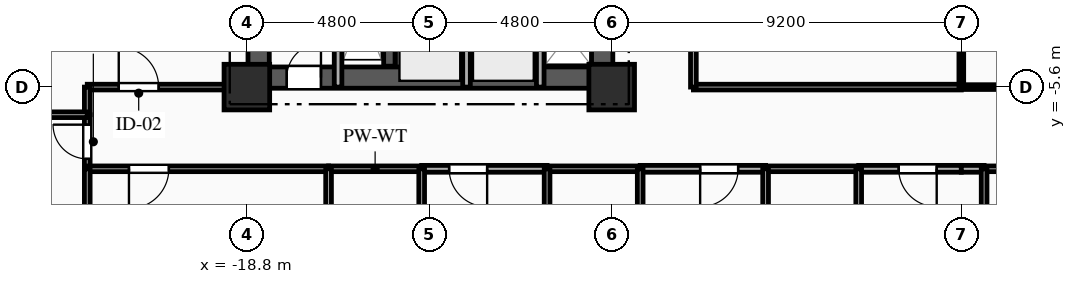
"""IFC4 building model, lengths in metres.
Left out: names, types, materials, properties, quantities, classifications, styles, units other than length and angle.
Written with IfcOpenShell. Run it as: python <this file> out.ifc"""

import sys

from ifc_helpers import new_model, si_unit, direction, frame, frame_2d, origin, origin_2d, place, context, subcontext, project, spatial, rectangle, extrude, element, fill, save


model = new_model("IFC4")
c1 = context("Model", 3, precision=1e-05, world=origin(), true_north=direction((0.0, 1.0)))
c2 = subcontext(c1, "Body", "Model", "MODEL_VIEW")
j1 = project(units=[si_unit("LENGTHUNIT", "METRE"), si_unit("PLANEANGLEUNIT", "RADIAN")], contexts=[c1])
p1 = place(None, origin())
s1 = spatial("IfcSite", under=j1, at=p1, CompositionType="ELEMENT")
p2 = place(p1, origin())
s2 = spatial("IfcBuilding", under=s1, at=p2, CompositionType="ELEMENT")
p3 = place(p2, frame((0.0, 0.0, 63.85)))
s3 = spatial("IfcBuildingStorey", under=s2, at=p3, CompositionType="ELEMENT", Elevation=63.85)
for number, where, z_axis, x_axis in (
    (1, (-18.8, -5.6, 0.0), (0.0, 0.0, 1.0), (1.0, 0.0, 0.0)),
    (2, (-9.2, -5.6, 0.0), (0.0, 0.0, 1.0), (1.0, 0.0, 0.0)),
):
    element("IfcColumn", number, at=place(p3, frame(where, z_axis=z_axis, x_axis=x_axis)), inside=s3, PredefinedType="COLUMN", context=c2, shape_type="SweptSolid", body=[
        extrude(rectangle(XDim=1.2, YDim=1.2, at=origin_2d()), origin(), (0.0, 0.0, 1.0), 3.35),
    ])
p4 = place(p3, frame((-18.8, -5.35, 0.0), z_axis=(0.0, 0.0, 1.0), x_axis=(1.0, 0.0, 0.0)))
e3 = element("IfcWall", 3, at=p4, inside=s3, PredefinedType="SHEAR", context=c2, shape_type="SweptSolid", body=[
    extrude(rectangle(XDim=9.6, YDim=0.56, at=frame_2d((4.8, 0.0))), origin(), (0.0, 0.0, 1.0), 3.035),
])
p5 = place(p4, frame((1.05, 0.0, 0.0)))
e4 = element("IfcOpeningElement", 4, at=p5, cuts=e3, PredefinedType="OPENING", context=c2, shape_type="SweptSolid", body=[
    extrude(rectangle(XDim=0.9, YDim=2.1, at=frame_2d((0.45, 1.05))), frame((0.0, 0.29, 0.0), z_axis=(0.0, -1.0, 0.0), x_axis=(1.0, 0.0, 0.0)), (0.0, 0.0, 1.0), 0.58),
])
p6 = place(p3, frame((-18.49, -5.05, 0.0), z_axis=(0.0, 0.0, 1.0), x_axis=(0.0, 1.0, 0.0)))
e5 = element("IfcWall", 5, at=p6, inside=s3, PredefinedType="SHEAR", context=c2, shape_type="SweptSolid", body=[
    extrude(rectangle(XDim=10.1, YDim=0.56, at=frame_2d((5.05, 0.0))), origin(), (0.0, 0.0, 1.0), 3.035),
])
p7 = place(p3, frame((-9.45, -5.05, 0.0), z_axis=(0.0, 0.0, 1.0), x_axis=(0.0, 1.0, 0.0)))
e6 = element("IfcWall", 6, at=p7, inside=s3, PredefinedType="SHEAR", context=c2, shape_type="SweptSolid", body=[
    extrude(rectangle(XDim=10.1, YDim=0.56, at=frame_2d((5.05, 0.0))), origin(), (0.0, 0.0, 1.0), 3.035),
])
p8 = place(p7, frame((7.175, 0.0, 0.0)))
e7 = element("IfcOpeningElement", 7, at=p8, cuts=e6, PredefinedType="OPENING", context=c2, shape_type="SweptSolid", body=[
    extrude(rectangle(XDim=0.9, YDim=2.1, at=frame_2d((0.45, 1.05))), frame((0.0, 0.29, 0.0), z_axis=(0.0, -1.0, 0.0), x_axis=(1.0, 0.0, 0.0)), (0.0, 0.0, 1.0), 0.58),
])
p9 = place(p7, frame((2.4, 0.0, 0.0)))
e8 = element("IfcOpeningElement", 8, at=p9, cuts=e6, PredefinedType="OPENING", context=c2, shape_type="SweptSolid", body=[
    extrude(rectangle(XDim=1.2, YDim=2.15, at=frame_2d((0.6, 1.075))), frame((0.0, 0.29, 0.0), z_axis=(0.0, -1.0, 0.0), x_axis=(1.0, 0.0, 0.0)), (0.0, 0.0, 1.0), 0.58),
])
p10 = place(p3, frame((-15.05, -5.05, 0.0), z_axis=(0.0, 0.0, 1.0), x_axis=(0.0, 1.0, 0.0)))
e9 = element("IfcWall", 9, at=p10, inside=s3, PredefinedType="SHEAR", context=c2, shape_type="SweptSolid", body=[
    extrude(rectangle(XDim=10.1, YDim=0.3, at=frame_2d((5.05, 0.0))), origin(), (0.0, 0.0, 1.0), 3.035),
])
p11 = place(p3, frame((-16.4, -5.6, 0.0), z_axis=(0.0, 0.0, 1.0), x_axis=(0.0, 1.0, 0.0)))
e10 = element("IfcWall", 10, at=p11, inside=s3, PredefinedType="PARTITIONING", context=c2, shape_type="SweptSolid", body=[
    extrude(rectangle(XDim=3.49, YDim=0.2, at=frame_2d((1.745, 0.0))), origin(), (0.0, 0.0, 1.0), 3.035),
])
for number, where, z_axis, x_axis in (
    (11, (-13.02, -5.6, 0.0), (0.0, 0.0, 1.0), (0.0, 1.0, 0.0)),
    (12, (-11.08, -5.6, 0.0), (0.0, 0.0, 1.0), (0.0, 1.0, 0.0)),
):
    element("IfcWall", number, at=place(p3, frame(where, z_axis=z_axis, x_axis=x_axis)), inside=s3, PredefinedType="PARTITIONING", context=c2, shape_type="SweptSolid", body=[
        extrude(rectangle(XDim=2.25, YDim=0.2, at=frame_2d((1.125, 0.0))), origin(), (0.0, 0.0, 1.0), 3.035),
    ])
p12 = place(p3, frame((-23.0, -7.75, 0.0), z_axis=(0.0, 0.0, 1.0), x_axis=(0.0, 1.0, 0.0)))
e13 = element("IfcWall", 13, at=p12, inside=s3, PredefinedType="PARTITIONING", context=c2, shape_type="SweptSolid", body=[
    extrude(rectangle(XDim=1.423, YDim=0.15, at=frame_2d((0.711, 0.0))), origin(), (0.0, 0.0, 1.0), 3.035),
])
p13 = place(p12, frame((0.261, 0.0, 0.0)))
e14 = element("IfcOpeningElement", 14, at=p13, cuts=e13, PredefinedType="OPENING", context=c2, shape_type="SweptSolid", body=[
    extrude(rectangle(XDim=0.9, YDim=2.1, at=frame_2d((0.45, 1.05))), frame((0.0, 0.085, 0.0), z_axis=(0.0, -1.0, 0.0), x_axis=(1.0, 0.0, 0.0)), (0.0, 0.0, 1.0), 0.17),
])
p14 = place(p3, frame((-23.0, -5.6, 0.0), z_axis=(0.0, 0.0, 1.0), x_axis=(1.0, 0.0, 0.0)))
e15 = element("IfcWall", 15, at=p14, inside=s3, PredefinedType="PARTITIONING", context=c2, shape_type="SweptSolid", body=[
    extrude(rectangle(XDim=4.2, YDim=0.15, at=frame_2d((2.1, 0.0))), origin(), (0.0, 0.0, 1.0), 3.035),
])
p15 = place(p14, frame((0.829, 0.0, 0.0)))
e16 = element("IfcOpeningElement", 16, at=p15, cuts=e15, PredefinedType="OPENING", context=c2, shape_type="SweptSolid", body=[
    extrude(rectangle(XDim=1.05, YDim=2.15, at=frame_2d((0.525, 1.075))), frame((0.0, 0.085, 0.0), z_axis=(0.0, -1.0, 0.0), x_axis=(1.0, 0.0, 0.0)), (0.0, 0.0, 1.0), 0.17),
])
p16 = place(p3, frame((-23.0, -6.327, 0.0), z_axis=(0.0, 0.0, 1.0), x_axis=(0.0, 1.0, 0.0)))
e17 = element("IfcWall", 17, at=p16, inside=s3, PredefinedType="PARTITIONING", context=c2, shape_type="SweptSolid", body=[
    extrude(rectangle(XDim=0.727, YDim=0.15, at=frame_2d((0.363, 0.0))), origin(), (0.0, 0.0, 1.0), 3.035),
])
p17 = place(p3, frame((-16.65, -7.75, 0.0), z_axis=(0.0, 0.0, 1.0), x_axis=(-1.0, 0.0, 0.0)))
e18 = element("IfcWall", 18, at=p17, inside=s3, PredefinedType="PARTITIONING", context=c2, shape_type="SweptSolid", body=[
    extrude(rectangle(XDim=6.35, YDim=0.15, at=frame_2d((3.175, 0.0))), origin(), (0.0, 0.0, 1.0), 3.035),
])
p18 = place(p17, frame((4.202, 0.0, 0.0)))
e19 = element("IfcOpeningElement", 19, at=p18, cuts=e18, PredefinedType="OPENING", context=c2, shape_type="SweptSolid", body=[
    extrude(rectangle(XDim=1.05, YDim=2.15, at=frame_2d((0.525, 1.075))), frame((0.0, 0.085, 0.0), z_axis=(0.0, -1.0, 0.0), x_axis=(1.0, 0.0, 0.0)), (0.0, 0.0, 1.0), 0.17),
])
p19 = place(p3, frame((-10.9, -7.75, 0.0), z_axis=(0.0, 0.0, 1.0), x_axis=(-1.0, 0.0, 0.0)))
e20 = element("IfcWall", 20, at=p19, inside=s3, PredefinedType="PARTITIONING", context=c2, shape_type="SweptSolid", body=[
    extrude(rectangle(XDim=3.3, YDim=0.18, at=frame_2d((1.65, 0.0))), origin(), (0.0, 0.0, 1.0), 3.035),
])
p20 = place(p19, frame((1.577, 0.0, 0.0)))
e21 = element("IfcOpeningElement", 21, at=p20, cuts=e20, PredefinedType="OPENING", context=c2, shape_type="SweptSolid", body=[
    extrude(rectangle(XDim=1.0, YDim=2.15, at=frame_2d((0.5, 1.075))), frame((0.0, 0.1, 0.0), z_axis=(0.0, -1.0, 0.0), x_axis=(1.0, 0.0, 0.0)), (0.0, 0.0, 1.0), 0.2),
])
p21 = place(p3, frame((-14.2, -7.75, 0.0), z_axis=(0.0, 0.0, 1.0), x_axis=(-1.0, 0.0, 0.0)))
e22 = element("IfcWall", 22, at=p21, inside=s3, PredefinedType="PLUMBINGWALL", context=c2, shape_type="SweptSolid", body=[
    extrude(rectangle(XDim=2.45, YDim=0.15, at=frame_2d((1.225, 0.0))), origin(), (0.0, 0.0, 1.0), 3.035),
])
p22 = place(p3, frame((-5.15, -7.75, 0.0), z_axis=(0.0, 0.0, 1.0), x_axis=(-1.0, 0.0, 0.0)))
e23 = element("IfcWall", 23, at=p22, inside=s3, PredefinedType="PARTITIONING", context=c2, shape_type="SweptSolid", body=[
    extrude(rectangle(XDim=3.3, YDim=0.18, at=frame_2d((1.65, 0.0))), origin(), (0.0, 0.0, 1.0), 3.035),
])
p23 = place(p22, frame((0.722, 0.0, 0.0)))
e24 = element("IfcOpeningElement", 24, at=p23, cuts=e23, PredefinedType="OPENING", context=c2, shape_type="SweptSolid", body=[
    extrude(rectangle(XDim=1.0, YDim=2.15, at=frame_2d((0.5, 1.075))), frame((0.0, 0.1, 0.0), z_axis=(0.0, -1.0, 0.0), x_axis=(1.0, 0.0, 0.0)), (0.0, 0.0, 1.0), 0.2),
])
p24 = place(p3, frame((-8.45, -7.75, 0.0), z_axis=(0.0, 0.0, 1.0), x_axis=(-1.0, 0.0, 0.0)))
e25 = element("IfcWall", 25, at=p24, inside=s3, PredefinedType="PLUMBINGWALL", context=c2, shape_type="SweptSolid", body=[
    extrude(rectangle(XDim=2.45, YDim=0.15, at=frame_2d((1.225, 0.0))), origin(), (0.0, 0.0, 1.0), 3.035),
])
p25 = place(p3, frame((0.0, -7.75, 0.0), z_axis=(0.0, 0.0, 1.0), x_axis=(-1.0, 0.0, 0.0)))
e26 = element("IfcWall", 26, at=p25, inside=s3, PredefinedType="PARTITIONING", context=c2, shape_type="SweptSolid", body=[
    extrude(rectangle(XDim=2.7, YDim=0.18, at=frame_2d((1.35, 0.0))), origin(), (0.0, 0.0, 1.0), 3.035),
])
p26 = place(p25, frame((0.647, 0.0, 0.0)))
e27 = element("IfcOpeningElement", 27, at=p26, cuts=e26, PredefinedType="OPENING", context=c2, shape_type="SweptSolid", body=[
    extrude(rectangle(XDim=1.0, YDim=2.15, at=frame_2d((0.5, 1.075))), frame((0.0, 0.1, 0.0), z_axis=(0.0, -1.0, 0.0), x_axis=(1.0, 0.0, 0.0)), (0.0, 0.0, 1.0), 0.2),
])
p27 = place(p3, frame((-2.7, -7.75, 0.0), z_axis=(0.0, 0.0, 1.0), x_axis=(-1.0, 0.0, 0.0)))
e28 = element("IfcWall", 28, at=p27, inside=s3, PredefinedType="PLUMBINGWALL", context=c2, shape_type="SweptSolid", body=[
    extrude(rectangle(XDim=2.45, YDim=0.15, at=frame_2d((1.225, 0.0))), origin(), (0.0, 0.0, 1.0), 3.035),
])
p28 = place(p3, frame((-7.05, -5.6, 0.0), z_axis=(0.0, 0.0, 1.0), x_axis=(1.0, 0.0, 0.0)))
e29 = element("IfcWall", 29, at=p28, inside=s3, PredefinedType="PARTITIONING", context=c2, shape_type="SweptSolid", body=[
    extrude(rectangle(XDim=7.05, YDim=0.15, at=frame_2d((3.525, 0.0))), origin(), (0.0, 0.0, 1.0), 2.52),
])
p29 = place(p3, frame((0.6, -7.75, 0.0), z_axis=(0.0, 0.0, 1.0), x_axis=(-1.0, 0.0, 0.0)))
e30 = element("IfcWall", 30, at=p29, inside=s3, PredefinedType="PARTITIONING", context=c2, shape_type="SweptSolid", body=[
    extrude(rectangle(XDim=0.6, YDim=0.18, at=frame_2d((0.3, 0.0))), origin(), (0.0, 0.0, 1.0), 3.035),
])
p30 = place(p3, frame((3.05, -7.75, 0.0), z_axis=(0.0, 0.0, 1.0), x_axis=(-1.0, 0.0, 0.0)))
e31 = element("IfcWall", 31, at=p30, inside=s3, PredefinedType="PLUMBINGWALL", context=c2, shape_type="SweptSolid", body=[
    extrude(rectangle(XDim=2.45, YDim=0.15, at=frame_2d((1.225, 0.0))), origin(), (0.0, 0.0, 1.0), 3.035),
])
p31 = place(p3, frame((0.0, -5.6, 0.0), z_axis=(0.0, 0.0, 1.0), x_axis=(1.0, 0.0, 0.0)))
e32 = element("IfcWall", 32, at=p31, inside=s3, PredefinedType="PARTITIONING", context=c2, shape_type="SweptSolid", body=[
    extrude(rectangle(XDim=7.05, YDim=0.125, at=frame_2d((3.525, 0.0))), origin(), (0.0, 0.0, 1.0), 2.52),
])
p32 = place(p3, frame((-7.05, 8.5, 0.0), z_axis=(0.0, 0.0, 1.0), x_axis=(0.0, -1.0, 0.0)))
e33 = element("IfcWall", 33, at=p32, inside=s3, PredefinedType="PARTITIONING", context=c2, shape_type="SweptSolid", body=[
    extrude(rectangle(XDim=14.1, YDim=0.15, at=frame_2d((7.05, 0.0))), origin(), (0.0, 0.0, 1.0), 3.035),
])
p33 = place(p32, frame((8.074, 0.0, 0.0)))
e34 = element("IfcOpeningElement", 34, at=p33, cuts=e33, PredefinedType="OPENING", context=c2, shape_type="SweptSolid", body=[
    extrude(rectangle(XDim=0.95, YDim=2.1, at=frame_2d((0.475, 1.05))), frame((0.0, 0.085, 0.0), z_axis=(0.0, -1.0, 0.0), x_axis=(1.0, 0.0, 0.0)), (0.0, 0.0, 1.0), 0.17),
])
p34 = place(p3, frame((-25.59, -6.327, 0.0), z_axis=(0.0, 0.0, 1.0), x_axis=(1.0, 0.0, 0.0)))
e35 = element("IfcWall", 35, at=p34, inside=s3, PredefinedType="PARTITIONING", context=c2, shape_type="SweptSolid", body=[
    extrude(rectangle(XDim=2.59, YDim=0.15, at=frame_2d((1.295, 0.0))), origin(), (0.0, 0.0, 1.0), 3.035),
])
p35 = place(p3, frame((-23.0, -7.75, 0.0), z_axis=(0.0, 0.0, 1.0), x_axis=(0.0, -1.0, 0.0)))
e36 = element("IfcWall", 36, at=p35, inside=s3, PredefinedType="PARTITIONING", context=c2, shape_type="SweptSolid", body=[
    extrude(rectangle(XDim=11.65, YDim=0.15, at=frame_2d((5.825, 0.0))), origin(), (0.0, 0.0, 1.0), 3.035),
])
for number, where, z_axis, x_axis in (
    (37, (-16.65, -7.75, 0.0), (0.0, 0.0, 1.0), (0.0, -1.0, 0.0)),
    (38, (-14.2, -9.9, 0.0), (0.0, 0.0, 1.0), (0.0, 1.0, 0.0)),
    (39, (-10.9, -7.75, 0.0), (0.0, 0.0, 1.0), (0.0, -1.0, 0.0)),
    (40, (-8.45, -9.9, 0.0), (0.0, 0.0, 1.0), (0.0, 1.0, 0.0)),
    (41, (-5.15, -7.75, 0.0), (0.0, 0.0, 1.0), (0.0, -1.0, 0.0)),
    (42, (-2.7, -9.9, 0.0), (0.0, 0.0, 1.0), (0.0, 1.0, 0.0)),
    (43, (0.6, -7.75, 0.0), (0.0, 0.0, 1.0), (0.0, -1.0, 0.0)),
):
    element("IfcWall", number, at=place(p3, frame(where, z_axis=z_axis, x_axis=x_axis)), inside=s3, PredefinedType="PLUMBINGWALL", context=c2, shape_type="SweptSolid", body=[
        extrude(rectangle(XDim=2.15, YDim=0.15, at=frame_2d((1.075, 0.0))), origin(), (0.0, 0.0, 1.0), 3.035),
    ])
p36 = place(p3, frame((0.0, 8.5, 0.0), z_axis=(0.0, 0.0, 1.0), x_axis=(0.0, -1.0, 0.0)))
e44 = element("IfcWall", 44, at=p36, inside=s3, PredefinedType="PARTITIONING", context=c2, shape_type="SweptSolid", body=[
    extrude(rectangle(XDim=14.1, YDim=0.125, at=frame_2d((7.05, 0.0))), origin(), (0.0, 0.0, 1.0), 3.035),
])
p37 = place(p5, origin())
e45 = element("IfcDoor", 45, at=p37, inside=s3, OperationType="SINGLE_SWING_RIGHT", PredefinedType="DOOR", context=c2, shape_type="SweptSolid", body=[
    extrude(rectangle(XDim=0.9, YDim=2.1, at=frame_2d((0.45, 1.05))), frame((0.0, 0.025, 0.0), z_axis=(0.0, -1.0, 0.0), x_axis=(1.0, 0.0, 0.0)), (0.0, 0.0, 1.0), 0.05),
])
fill(e4, e45)
p38 = place(p13, origin())
e46 = element("IfcDoor", 46, at=p38, inside=s3, OperationType="SINGLE_SWING_RIGHT", PredefinedType="DOOR", context=c2, shape_type="SweptSolid", body=[
    extrude(rectangle(XDim=0.9, YDim=2.1, at=frame_2d((0.45, 1.05))), frame((0.0, 0.025, 0.0), z_axis=(0.0, -1.0, 0.0), x_axis=(1.0, 0.0, 0.0)), (0.0, 0.0, 1.0), 0.05),
])
fill(e14, e46)
p39 = place(p15, origin())
e47 = element("IfcDoor", 47, at=p39, inside=s3, OperationType="SINGLE_SWING_LEFT", PredefinedType="DOOR", context=c2, shape_type="SweptSolid", body=[
    extrude(rectangle(XDim=1.05, YDim=2.15, at=frame_2d((0.525, 1.075))), frame((0.0, 0.025, 0.0), z_axis=(0.0, -1.0, 0.0), x_axis=(1.0, 0.0, 0.0)), (0.0, 0.0, 1.0), 0.05),
])
fill(e16, e47)
p40 = place(p18, origin())
e48 = element("IfcDoor", 48, at=p40, inside=s3, OperationType="SINGLE_SWING_RIGHT", PredefinedType="DOOR", context=c2, shape_type="SweptSolid", body=[
    extrude(rectangle(XDim=1.05, YDim=2.15, at=frame_2d((0.525, 1.075))), frame((0.0, 0.025, 0.0), z_axis=(0.0, -1.0, 0.0), x_axis=(1.0, 0.0, 0.0)), (0.0, 0.0, 1.0), 0.05),
])
fill(e19, e48)
p41 = place(p20, origin())
e49 = element("IfcDoor", 49, at=p41, inside=s3, OperationType="SINGLE_SWING_LEFT", PredefinedType="DOOR", context=c2, shape_type="SweptSolid", body=[
    extrude(rectangle(XDim=1.0, YDim=2.15, at=frame_2d((0.5, 1.075))), frame((0.0, 0.025, 0.0), z_axis=(0.0, -1.0, 0.0), x_axis=(1.0, 0.0, 0.0)), (0.0, 0.0, 1.0), 0.05),
])
fill(e21, e49)
p42 = place(p23, origin())
e50 = element("IfcDoor", 50, at=p42, inside=s3, OperationType="SINGLE_SWING_RIGHT", PredefinedType="DOOR", context=c2, shape_type="SweptSolid", body=[
    extrude(rectangle(XDim=1.0, YDim=2.15, at=frame_2d((0.5, 1.075))), frame((0.0, 0.025, 0.0), z_axis=(0.0, -1.0, 0.0), x_axis=(1.0, 0.0, 0.0)), (0.0, 0.0, 1.0), 0.05),
])
fill(e24, e50)
p43 = place(p26, origin())
e51 = element("IfcDoor", 51, at=p43, inside=s3, OperationType="SINGLE_SWING_LEFT", PredefinedType="DOOR", context=c2, shape_type="SweptSolid", body=[
    extrude(rectangle(XDim=1.0, YDim=2.15, at=frame_2d((0.5, 1.075))), frame((0.0, 0.025, 0.0), z_axis=(0.0, -1.0, 0.0), x_axis=(1.0, 0.0, 0.0)), (0.0, 0.0, 1.0), 0.05),
])
fill(e27, e51)
save(model, sys.argv[1])
